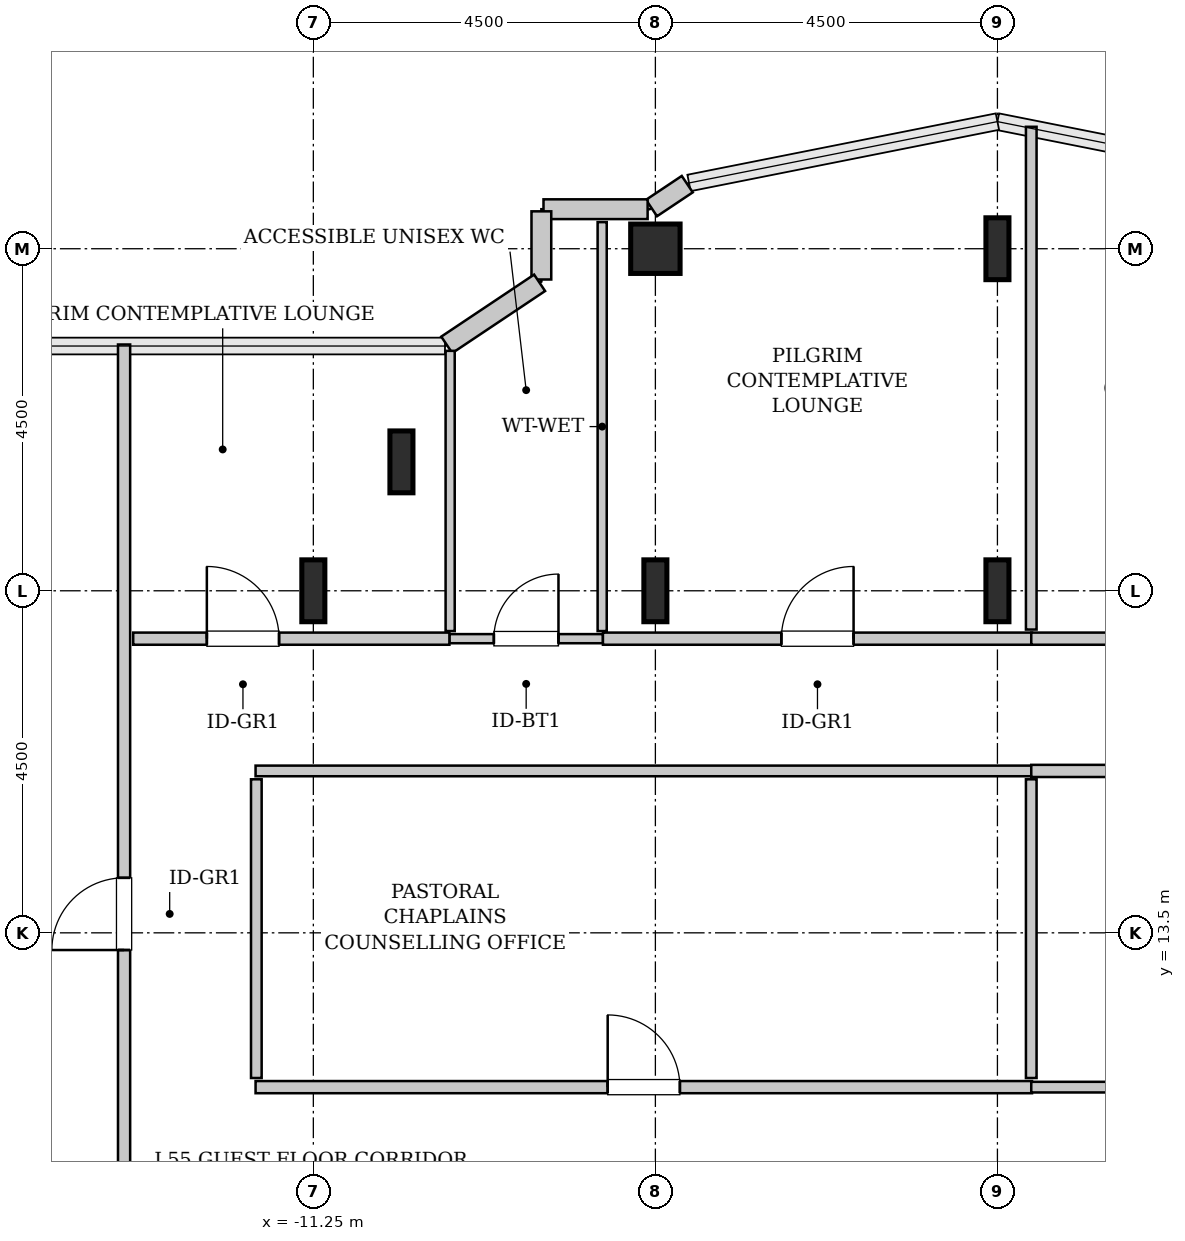
"""IFC4 building model, lengths in metres.
Left out: names, types, materials, properties, quantities, classifications, styles, units other than length and angle.
Written with IfcOpenShell. Run it as: python <this file> out.ifc"""

import sys

from ifc_helpers import new_model, si_unit, direction, frame, frame_2d, origin, origin_2d, place, context, subcontext, project, spatial, rectangle, hollow_rectangle, i_section, extrude, source, transform, mapped, element, fill, save


model = new_model("IFC4")
c1 = context("Model", 3, precision=1e-05, world=origin(), true_north=direction((0.0, 1.0)))
c2 = subcontext(c1, "Body", "Model", "MODEL_VIEW")
j1 = project(units=[si_unit("LENGTHUNIT", "METRE"), si_unit("PLANEANGLEUNIT", "RADIAN")], contexts=[c1])
p1 = place(None, origin())
s1 = spatial("IfcSite", under=j1, at=p1, CompositionType="ELEMENT")
p2 = place(p1, origin())
s2 = spatial("IfcBuilding", under=s1, at=p2, CompositionType="ELEMENT")
p3 = place(p2, frame((0.0, 0.0, 221.8)))
s3 = spatial("IfcBuildingStorey", under=s2, at=p3, CompositionType="ELEMENT", Elevation=221.8)
m1 = source(origin(), c2, "Body", "SweptSolid", [
    extrude(i_section(OverallWidth=0.303, OverallDepth=0.814, WebThickness=0.021, FlangeThickness=0.04, FilletRadius=0.03, at=origin_2d()), origin(), (0.0, 0.0, 1.0), 3.8),
])
for number, where, z_axis, x_axis in (
    (1, (-11.25, 18.0, 0.0), (0.0, 0.0, 1.0), (1.0, 0.0, 0.0)),
    (2, (-10.091, 19.696, 0.0), (0.0, 0.0, 1.0), (1.0, 0.0, 0.0)),
    (3, (-6.75, 18.0, 0.0), (0.0, 0.0, 1.0), (1.0, 0.0, 0.0)),
):
    element("IfcColumn", number, at=place(p3, frame(where, z_axis=z_axis, x_axis=x_axis)), inside=s3, PredefinedType="COLUMN", context=c2, shape_type="MappedRepresentation", body=[
        mapped(m1, transform((0.0, 0.0, 0.0), x_axis=(1.0, 0.0, 0.0), y_axis=(0.0, 1.0, 0.0), z_axis=(0.0, 0.0, 1.0), scale=1.0)),
    ])
m2 = source(origin(), c2, "Body", "SweptSolid", [
    extrude(hollow_rectangle(XDim=0.65, YDim=0.65, WallThickness=0.032, InnerFilletRadius=0.032, OuterFilletRadius=0.064, at=origin_2d()), origin(), (0.0, 0.0, 1.0), 3.8),
])
p4 = place(p3, frame((-6.75, 22.5, 0.0), z_axis=(0.0, 0.0, 1.0), x_axis=(1.0, 0.0, 0.0)))
e4 = element("IfcColumn", 4, at=p4, inside=s3, PredefinedType="COLUMN", context=c2, shape_type="MappedRepresentation", body=[
    mapped(m2, transform((0.0, 0.0, 0.0), x_axis=(1.0, 0.0, 0.0), y_axis=(0.0, 1.0, 0.0), z_axis=(0.0, 0.0, 1.0), scale=1.0)),
])
for number, where, z_axis, x_axis in (
    (5, (-2.25, 18.0, 0.0), (0.0, 0.0, 1.0), (1.0, 0.0, 0.0)),
    (6, (-2.25, 22.5, 0.0), (0.0, 0.0, 1.0), (1.0, 0.0, 0.0)),
):
    element("IfcColumn", number, at=place(p3, frame(where, z_axis=z_axis, x_axis=x_axis)), inside=s3, PredefinedType="COLUMN", context=c2, shape_type="MappedRepresentation", body=[
        mapped(m1, transform((0.0, 0.0, 0.0), x_axis=(1.0, 0.0, 0.0), y_axis=(0.0, 1.0, 0.0), z_axis=(0.0, 0.0, 1.0), scale=1.0)),
    ])
m3 = source(origin(), c2, "Body", "SweptSolid", [
    extrude(rectangle(XDim=0.565, YDim=0.26, at=frame_2d((0.283, 0.0))), origin(), (0.0, 0.0, 1.0), 3.55),
])
p5 = place(p3, frame((-6.331, 23.35, 0.0), z_axis=(0.0, 0.0, 1.0), x_axis=(-0.831651492666, -0.555297933317, 0.0)))
e7 = element("IfcWall", 7, at=p5, inside=s3, PredefinedType="SOLIDWALL", context=c2, shape_type="MappedRepresentation", body=[
    mapped(m3, transform((0.0, 0.0, 0.0), x_axis=(1.0, 0.0, 0.0), y_axis=(0.0, 1.0, 0.0), z_axis=(0.0, 0.0, 1.0), scale=1.0)),
])
m4 = source(origin(), c2, "Body", "SweptSolid", [
    extrude(rectangle(XDim=1.37, YDim=0.26, at=frame_2d((0.685, 0.0))), origin(), (0.0, 0.0, 1.0), 3.55),
])
p6 = place(p3, frame((-6.852, 23.02, 0.0), z_axis=(0.0, 0.0, 1.0), x_axis=(-1.0, 0.0, 0.0)))
e8 = element("IfcWall", 8, at=p6, inside=s3, PredefinedType="SOLIDWALL", context=c2, shape_type="MappedRepresentation", body=[
    mapped(m4, transform((0.0, 0.0, 0.0), x_axis=(1.0, 0.0, 0.0), y_axis=(0.0, 1.0, 0.0), z_axis=(0.0, 0.0, 1.0), scale=1.0)),
])
m5 = source(origin(), c2, "Body", "SweptSolid", [
    extrude(rectangle(XDim=0.897, YDim=0.26, at=frame_2d((0.448, 0.0))), origin(), (0.0, 0.0, 1.0), 3.55),
])
p7 = place(p3, frame((-8.25, 22.992, 0.0), z_axis=(0.0, 0.0, 1.0), x_axis=(0.0, -1.0, 0.0)))
e9 = element("IfcWall", 9, at=p7, inside=s3, PredefinedType="SOLIDWALL", context=c2, shape_type="MappedRepresentation", body=[
    mapped(m5, transform((0.0, 0.0, 0.0), x_axis=(1.0, 0.0, 0.0), y_axis=(0.0, 1.0, 0.0), z_axis=(0.0, 0.0, 1.0), scale=1.0)),
])
m6 = source(origin(), c2, "Body", "SweptSolid", [
    extrude(rectangle(XDim=1.469, YDim=0.26, at=frame_2d((0.734, 0.0))), origin(), (0.0, 0.0, 1.0), 3.55),
])
p8 = place(p3, frame((-8.273, 22.052, 0.0), z_axis=(0.0, 0.0, 1.0), x_axis=(-0.831461760506, -0.555581983884, 0.0)))
e10 = element("IfcWall", 10, at=p8, inside=s3, PredefinedType="SOLIDWALL", context=c2, shape_type="MappedRepresentation", body=[
    mapped(m6, transform((0.0, 0.0, 0.0), x_axis=(1.0, 0.0, 0.0), y_axis=(0.0, 1.0, 0.0), z_axis=(0.0, 0.0, 1.0), scale=1.0)),
])
m7 = source(origin(), c2, "Body", "SweptSolid", [
    extrude(rectangle(XDim=2.02, YDim=0.12, at=frame_2d((1.01, 0.0))), origin(), (0.0, 0.0, 1.0), 3.535),
])
p9 = place(p3, frame((-9.46, 17.37, 0.0), z_axis=(0.0, 0.0, 1.0), x_axis=(1.0, 0.0, 0.0)))
e11 = element("IfcWall", 11, at=p9, inside=s3, PredefinedType="PLUMBINGWALL", context=c2, shape_type="MappedRepresentation", body=[
    mapped(m7, transform((0.0, 0.0, 0.0), x_axis=(1.0, 0.0, 0.0), y_axis=(0.0, 1.0, 0.0), z_axis=(0.0, 0.0, 1.0), scale=1.0)),
])
p10 = place(p9, frame((0.585, 0.0, 0.0)))
e12 = element("IfcOpeningElement", 12, at=p10, cuts=e11, PredefinedType="OPENING", context=c2, shape_type="SweptSolid", body=[
    extrude(rectangle(XDim=0.85, YDim=2.1, at=frame_2d((0.425, 1.05))), frame((0.0, 0.07, 0.0), z_axis=(0.0, -1.0, 0.0), x_axis=(1.0, 0.0, 0.0)), (0.0, 0.0, 1.0), 0.14),
])
m8 = source(origin(), c2, "Body", "SweptSolid", [
    extrude(rectangle(XDim=5.38, YDim=0.12, at=frame_2d((2.69, 0.0))), origin(), (0.0, 0.0, 1.0), 3.535),
])
p11 = place(p3, frame((-7.45, 17.47, 0.0), z_axis=(0.0, 0.0, 1.0), x_axis=(0.0, 1.0, 0.0)))
e13 = element("IfcWall", 13, at=p11, inside=s3, PredefinedType="PLUMBINGWALL", context=c2, shape_type="MappedRepresentation", body=[
    mapped(m8, transform((0.0, 0.0, 0.0), x_axis=(1.0, 0.0, 0.0), y_axis=(0.0, 1.0, 0.0), z_axis=(0.0, 0.0, 1.0), scale=1.0)),
])
m9 = source(origin(), c2, "Body", "SweptSolid", [
    extrude(rectangle(XDim=3.687, YDim=0.12, at=frame_2d((1.843, 0.0))), origin(), (0.0, 0.0, 1.0), 3.535),
])
p12 = place(p3, frame((-9.45, 17.47, 0.0), z_axis=(0.0, 0.0, 1.0), x_axis=(0.0, 1.0, 0.0)))
e14 = element("IfcWall", 14, at=p12, inside=s3, PredefinedType="PLUMBINGWALL", context=c2, shape_type="MappedRepresentation", body=[
    mapped(m9, transform((0.0, 0.0, 0.0), x_axis=(1.0, 0.0, 0.0), y_axis=(0.0, 1.0, 0.0), z_axis=(0.0, 0.0, 1.0), scale=1.0)),
])
m10 = source(origin(), c2, "Body", "SweptSolid", [
    extrude(rectangle(XDim=11.153, YDim=0.16, at=frame_2d((5.576, 0.0))), origin(), (0.0, 0.0, 1.0), 3.535),
])
p13 = place(p3, frame((-13.74, 10.087, 0.0), z_axis=(0.0, 0.0, 1.0), x_axis=(0.0, 1.0, 0.0)))
e15 = element("IfcWall", 15, at=p13, inside=s3, PredefinedType="PARTITIONING", context=c2, shape_type="MappedRepresentation", body=[
    mapped(m10, transform((0.0, 0.0, 0.0), x_axis=(1.0, 0.0, 0.0), y_axis=(0.0, 1.0, 0.0), z_axis=(0.0, 0.0, 1.0), scale=1.0)),
])
p14 = place(p13, frame((3.186, 0.0, 0.0)))
e16 = element("IfcOpeningElement", 16, at=p14, cuts=e15, PredefinedType="OPENING", context=c2, shape_type="SweptSolid", body=[
    extrude(rectangle(XDim=0.95, YDim=2.1, at=frame_2d((0.475, 1.05))), frame((0.0, 0.09, 0.0), z_axis=(0.0, -1.0, 0.0), x_axis=(1.0, 0.0, 0.0)), (0.0, 0.0, 1.0), 0.18),
])
m11 = source(origin(), c2, "Body", "SweptSolid", [
    extrude(rectangle(XDim=10.215, YDim=0.16, at=frame_2d((5.107, 0.0))), origin(), (0.0, 0.0, 1.0), 3.535),
])
p15 = place(p3, frame((-12.01, 11.47, 0.0), z_axis=(0.0, 0.0, 1.0), x_axis=(1.0, 0.0, 0.0)))
e17 = element("IfcWall", 17, at=p15, inside=s3, PredefinedType="PARTITIONING", context=c2, shape_type="MappedRepresentation", body=[
    mapped(m11, transform((0.0, 0.0, 0.0), x_axis=(1.0, 0.0, 0.0), y_axis=(0.0, 1.0, 0.0), z_axis=(0.0, 0.0, 1.0), scale=1.0)),
])
p16 = place(p15, frame((4.633, 0.0, 0.0)))
e18 = element("IfcOpeningElement", 18, at=p16, cuts=e17, PredefinedType="OPENING", context=c2, shape_type="SweptSolid", body=[
    extrude(rectangle(XDim=0.95, YDim=2.1, at=frame_2d((0.475, 1.05))), frame((0.0, 0.09, 0.0), z_axis=(0.0, -1.0, 0.0), x_axis=(1.0, 0.0, 0.0)), (0.0, 0.0, 1.0), 0.18),
])
m12 = source(origin(), c2, "Body", "SweptSolid", [
    extrude(rectangle(XDim=10.215, YDim=0.14, at=frame_2d((5.107, 0.0))), origin(), (0.0, 0.0, 1.0), 3.535),
])
p17 = place(p3, frame((-12.01, 15.63, 0.0), z_axis=(0.0, 0.0, 1.0), x_axis=(1.0, 0.0, 0.0)))
e19 = element("IfcWall", 19, at=p17, inside=s3, PredefinedType="PARTITIONING", context=c2, shape_type="MappedRepresentation", body=[
    mapped(m12, transform((0.0, 0.0, 0.0), x_axis=(1.0, 0.0, 0.0), y_axis=(0.0, 1.0, 0.0), z_axis=(0.0, 0.0, 1.0), scale=1.0)),
])
m13 = source(origin(), c2, "Body", "SweptSolid", [
    extrude(rectangle(XDim=3.93, YDim=0.14, at=frame_2d((1.965, 0.0))), origin(), (0.0, 0.0, 1.0), 3.535),
])
for number, where, z_axis, x_axis in (
    (20, (-12.0, 11.59, 0.0), (0.0, 0.0, 1.0), (0.0, 1.0, 0.0)),
    (21, (-1.805, 11.59, 0.0), (0.0, 0.0, 1.0), (0.0, 1.0, 0.0)),
):
    element("IfcWall", number, at=place(p3, frame(where, z_axis=z_axis, x_axis=x_axis)), inside=s3, PredefinedType="PARTITIONING", context=c2, shape_type="MappedRepresentation", body=[
        mapped(m13, transform((0.0, 0.0, 0.0), x_axis=(1.0, 0.0, 0.0), y_axis=(0.0, 1.0, 0.0), z_axis=(0.0, 0.0, 1.0), scale=1.0)),
    ])
m14 = source(origin(), c2, "Body", "SweptSolid", [
    extrude(rectangle(XDim=5.645, YDim=0.16, at=frame_2d((2.823, 0.0))), origin(), (0.0, 0.0, 1.0), 3.535),
])
p18 = place(p3, frame((-7.44, 17.37, 0.0), z_axis=(0.0, 0.0, 1.0), x_axis=(1.0, 0.0, 0.0)))
e22 = element("IfcWall", 22, at=p18, inside=s3, PredefinedType="PARTITIONING", context=c2, shape_type="MappedRepresentation", body=[
    mapped(m14, transform((0.0, 0.0, 0.0), x_axis=(1.0, 0.0, 0.0), y_axis=(0.0, 1.0, 0.0), z_axis=(0.0, 0.0, 1.0), scale=1.0)),
])
p19 = place(p18, frame((2.347, 0.0, 0.0)))
e23 = element("IfcOpeningElement", 23, at=p19, cuts=e22, PredefinedType="OPENING", context=c2, shape_type="SweptSolid", body=[
    extrude(rectangle(XDim=0.95, YDim=2.1, at=frame_2d((0.475, 1.05))), frame((0.0, 0.09, 0.0), z_axis=(0.0, -1.0, 0.0), x_axis=(1.0, 0.0, 0.0)), (0.0, 0.0, 1.0), 0.18),
])
m15 = source(origin(), c2, "Body", "SweptSolid", [
    extrude(rectangle(XDim=6.614, YDim=0.14, at=frame_2d((3.307, 0.0))), origin(), (0.0, 0.0, 1.0), 2.925),
])
p20 = place(p3, frame((-1.805, 17.49, 0.0), z_axis=(0.0, 0.0, 1.0), x_axis=(0.0, 1.0, 0.0)))
e24 = element("IfcWall", 24, at=p20, inside=s3, PredefinedType="PARTITIONING", context=c2, shape_type="MappedRepresentation", body=[
    mapped(m15, transform((0.0, 0.0, 0.0), x_axis=(1.0, 0.0, 0.0), y_axis=(0.0, 1.0, 0.0), z_axis=(0.0, 0.0, 1.0), scale=1.0)),
])
m16 = source(origin(), c2, "Body", "SweptSolid", [
    extrude(rectangle(XDim=4.16, YDim=0.16, at=frame_2d((2.08, 0.0))), origin(), (0.0, 0.0, 1.0), 3.535),
])
p21 = place(p3, frame((-13.62, 17.37, 0.0), z_axis=(0.0, 0.0, 1.0), x_axis=(1.0, 0.0, 0.0)))
e25 = element("IfcWall", 25, at=p21, inside=s3, PredefinedType="PARTITIONING", context=c2, shape_type="MappedRepresentation", body=[
    mapped(m16, transform((0.0, 0.0, 0.0), x_axis=(1.0, 0.0, 0.0), y_axis=(0.0, 1.0, 0.0), z_axis=(0.0, 0.0, 1.0), scale=1.0)),
])
p22 = place(p21, frame((0.969, 0.0, 0.0)))
e26 = element("IfcOpeningElement", 26, at=p22, cuts=e25, PredefinedType="OPENING", context=c2, shape_type="SweptSolid", body=[
    extrude(rectangle(XDim=0.95, YDim=2.1, at=frame_2d((0.475, 1.05))), frame((0.0, 0.09, 0.0), z_axis=(0.0, -1.0, 0.0), x_axis=(1.0, 0.0, 0.0)), (0.0, 0.0, 1.0), 0.18),
])
m17 = source(origin(), c2, "Body", "SweptSolid", [
    extrude(rectangle(XDim=7.765, YDim=0.16, at=frame_2d((3.882, 0.0))), origin(), (0.0, 0.0, 1.0), 3.535),
])
p23 = place(p3, frame((-1.805, 17.37, 0.0), z_axis=(0.0, 0.0, 1.0), x_axis=(1.0, 0.0, 0.0)))
e27 = element("IfcWall", 27, at=p23, inside=s3, PredefinedType="PARTITIONING", context=c2, shape_type="MappedRepresentation", body=[
    mapped(m17, transform((0.0, 0.0, 0.0), x_axis=(1.0, 0.0, 0.0), y_axis=(0.0, 1.0, 0.0), z_axis=(0.0, 0.0, 1.0), scale=1.0)),
])
p24 = place(p23, frame((2.407, 0.0, 0.0)))
e28 = element("IfcOpeningElement", 28, at=p24, cuts=e27, PredefinedType="OPENING", context=c2, shape_type="SweptSolid", body=[
    extrude(rectangle(XDim=0.95, YDim=2.1, at=frame_2d((0.475, 1.05))), frame((0.0, 0.09, 0.0), z_axis=(0.0, -1.0, 0.0), x_axis=(1.0, 0.0, 0.0)), (0.0, 0.0, 1.0), 0.18),
])
m18 = source(origin(), c2, "Body", "SweptSolid", [
    extrude(rectangle(XDim=13.815, YDim=0.16, at=frame_2d((6.907, 0.0))), origin(), (0.0, 0.0, 1.0), 3.535),
])
p25 = place(p3, frame((-1.805, 15.63, 0.0), z_axis=(0.0, 0.0, 1.0), x_axis=(1.0, 0.0, 0.0)))
e29 = element("IfcWall", 29, at=p25, inside=s3, PredefinedType="PARTITIONING", context=c2, shape_type="MappedRepresentation", body=[
    mapped(m18, transform((0.0, 0.0, 0.0), x_axis=(1.0, 0.0, 0.0), y_axis=(0.0, 1.0, 0.0), z_axis=(0.0, 0.0, 1.0), scale=1.0)),
])
p26 = place(p25, frame((6.433, 0.0, 0.0)))
e30 = element("IfcOpeningElement", 30, at=p26, cuts=e29, PredefinedType="OPENING", context=c2, shape_type="SweptSolid", body=[
    extrude(rectangle(XDim=0.95, YDim=2.1, at=frame_2d((0.475, 1.05))), frame((0.0, 0.09, 0.0), z_axis=(0.0, -1.0, 0.0), x_axis=(1.0, 0.0, 0.0)), (0.0, 0.0, 1.0), 0.18),
])
m19 = source(origin(), c2, "Body", "SweptSolid", [
    extrude(rectangle(XDim=13.815, YDim=0.14, at=frame_2d((6.907, 0.0))), origin(), (0.0, 0.0, 1.0), 3.535),
])
p27 = place(p3, frame((-1.805, 11.47, 0.0), z_axis=(0.0, 0.0, 1.0), x_axis=(1.0, 0.0, 0.0)))
e31 = element("IfcWall", 31, at=p27, inside=s3, PredefinedType="PARTITIONING", context=c2, shape_type="MappedRepresentation", body=[
    mapped(m19, transform((0.0, 0.0, 0.0), x_axis=(1.0, 0.0, 0.0), y_axis=(0.0, 1.0, 0.0), z_axis=(0.0, 0.0, 1.0), scale=1.0)),
])
m20 = source(origin(), c2, "Body", "SweptSolid", [
    extrude(rectangle(XDim=0.85, YDim=2.1, at=frame_2d((0.425, 1.05))), frame((0.0, 0.025, 0.0), z_axis=(0.0, -1.0, 0.0), x_axis=(1.0, 0.0, 0.0)), (0.0, 0.0, 1.0), 0.05),
])
p28 = place(p10, origin())
e32 = element("IfcDoor", 32, at=p28, inside=s3, OperationType="SINGLE_SWING_RIGHT", PredefinedType="DOOR", context=c2, shape_type="MappedRepresentation", body=[
    mapped(m20, transform((0.0, 0.0, 0.0), x_axis=(1.0, 0.0, 0.0), y_axis=(0.0, 1.0, 0.0), z_axis=(0.0, 0.0, 1.0), scale=1.0)),
])
fill(e12, e32)
m21 = source(origin(), c2, "Body", "SweptSolid", [
    extrude(rectangle(XDim=0.95, YDim=2.1, at=frame_2d((0.475, 1.05))), frame((0.0, 0.025, 0.0), z_axis=(0.0, -1.0, 0.0), x_axis=(1.0, 0.0, 0.0)), (0.0, 0.0, 1.0), 0.05),
])
p29 = place(p14, origin())
e33 = element("IfcDoor", 33, at=p29, inside=s3, OperationType="SINGLE_SWING_LEFT", PredefinedType="DOOR", context=c2, shape_type="MappedRepresentation", body=[
    mapped(m21, transform((0.0, 0.0, 0.0), x_axis=(1.0, 0.0, 0.0), y_axis=(0.0, 1.0, 0.0), z_axis=(0.0, 0.0, 1.0), scale=1.0)),
])
fill(e16, e33)
p30 = place(p16, origin())
e34 = element("IfcDoor", 34, at=p30, inside=s3, OperationType="SINGLE_SWING_LEFT", PredefinedType="DOOR", context=c2, shape_type="MappedRepresentation", body=[
    mapped(m21, transform((0.0, 0.0, 0.0), x_axis=(1.0, 0.0, 0.0), y_axis=(0.0, 1.0, 0.0), z_axis=(0.0, 0.0, 1.0), scale=1.0)),
])
fill(e18, e34)
p31 = place(p19, origin())
e35 = element("IfcDoor", 35, at=p31, inside=s3, OperationType="SINGLE_SWING_RIGHT", PredefinedType="DOOR", context=c2, shape_type="MappedRepresentation", body=[
    mapped(m21, transform((0.0, 0.0, 0.0), x_axis=(1.0, 0.0, 0.0), y_axis=(0.0, 1.0, 0.0), z_axis=(0.0, 0.0, 1.0), scale=1.0)),
])
fill(e23, e35)
p32 = place(p22, origin())
e36 = element("IfcDoor", 36, at=p32, inside=s3, OperationType="SINGLE_SWING_LEFT", PredefinedType="DOOR", context=c2, shape_type="MappedRepresentation", body=[
    mapped(m21, transform((0.0, 0.0, 0.0), x_axis=(1.0, 0.0, 0.0), y_axis=(0.0, 1.0, 0.0), z_axis=(0.0, 0.0, 1.0), scale=1.0)),
])
fill(e26, e36)
save(model, sys.argv[1])
